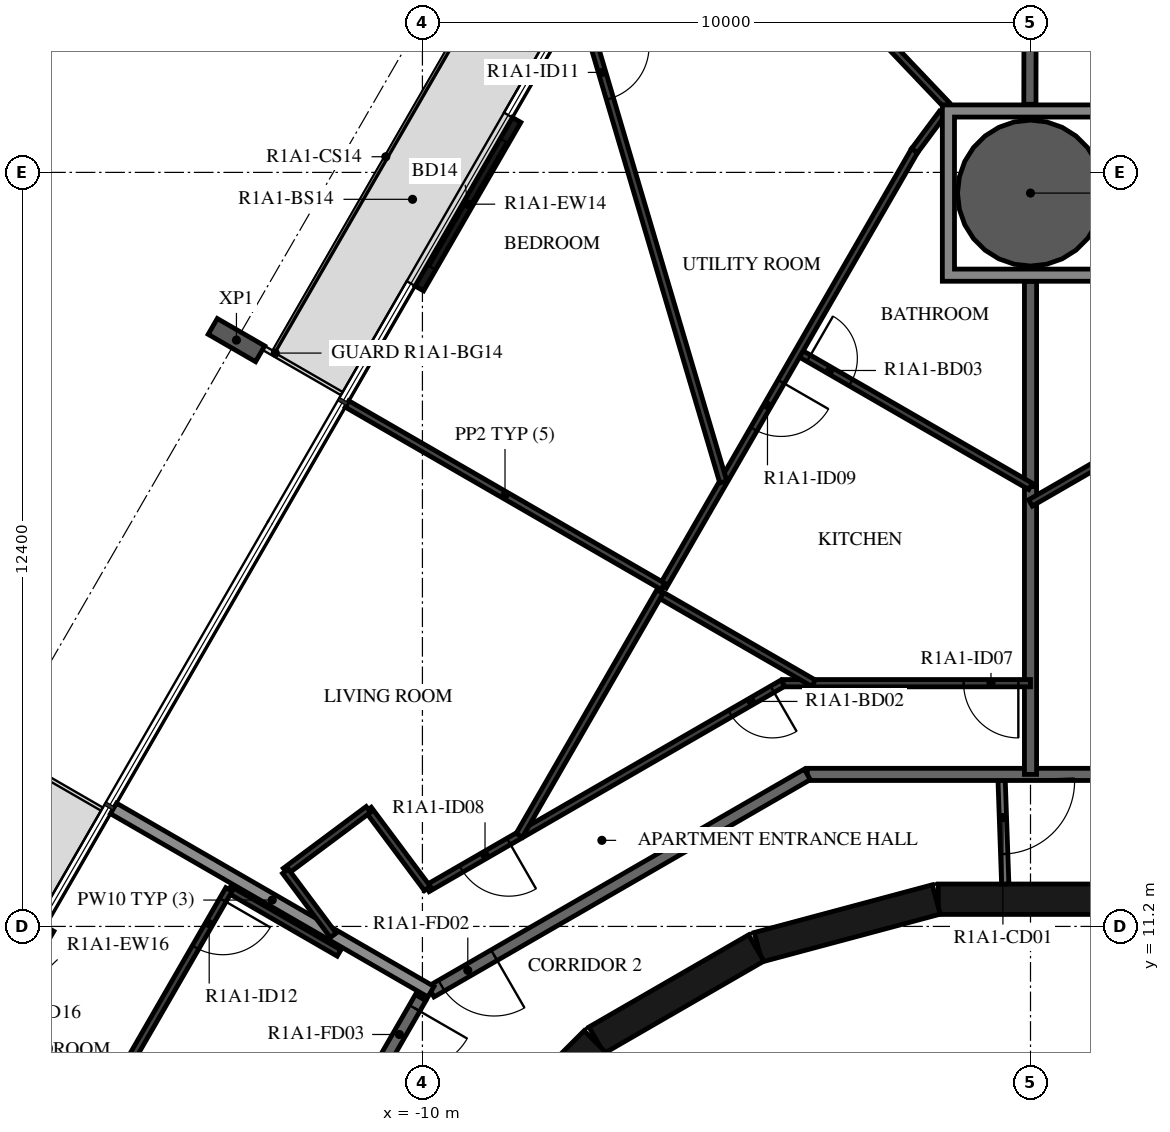
"""IFC4 building model, lengths in metres.
Left out: names, types, materials, properties, quantities, classifications, styles, units other than length and angle.
Written with IfcOpenShell. Run it as: python <this file> out.ifc"""

import sys

from ifc_helpers import new_model, si_unit, direction, frame, frame_2d, origin, origin_2d, place, context, subcontext, project, spatial, polyline, rectangle, hollow_circle, i_section, outline, extrude, element, fill, save


model = new_model("IFC4")
c1 = context("Model", 3, precision=1e-05, world=origin(), true_north=direction((0.0, 1.0)))
c2 = subcontext(c1, "Body", "Model", "MODEL_VIEW")
j1 = project(units=[si_unit("LENGTHUNIT", "METRE"), si_unit("PLANEANGLEUNIT", "RADIAN")], contexts=[c1])
p1 = place(None, origin())
s1 = spatial("IfcSite", under=j1, at=p1, CompositionType="ELEMENT")
p2 = place(p1, origin())
s2 = spatial("IfcBuilding", under=s1, at=p2, CompositionType="ELEMENT")
p3 = place(p2, frame((0.0, 0.0, 41.9)))
s3 = spatial("IfcBuildingStorey", under=s2, at=p3, CompositionType="ELEMENT", Elevation=41.9)
p4 = place(p3, frame((0.0, 23.26, -0.38), z_axis=(0.0, 0.0, 1.0), x_axis=(1.0, 0.0, 0.0)))
e1 = element("IfcColumn", 1, at=p4, inside=s3, PredefinedType="COLUMN", context=c2, shape_type="SweptSolid", body=[
    extrude(hollow_circle(Radius=1.2, WallThickness=0.06, at=origin_2d()), origin(), (0.0, 0.0, 1.0), 3.5),
])
p5 = place(p3, frame((-13.059, 20.842, -0.38), z_axis=(0.0, 0.0, 1.0), x_axis=(0.50000017485, 0.866025302835, 0.0)))
e2 = element("IfcColumn", 2, at=p5, inside=s3, PredefinedType="COLUMN", context=c2, shape_type="SweptSolid", body=[
    extrude(i_section(OverallWidth=0.3, OverallDepth=0.9, WebThickness=0.019, FlangeThickness=0.035, FilletRadius=0.03, at=origin_2d()), origin(), (0.0, 0.0, 1.0), 3.5),
])
p6 = place(p3, frame((-8.451, 24.463, 0.0), z_axis=(0.0, 0.0, 1.0), x_axis=(-0.499971222258, -0.866042017984, 0.0)))
e3 = element("IfcWall", 3, at=p6, inside=s3, PredefinedType="STANDARD", context=c2, shape_type="SweptSolid", body=[
    extrude(rectangle(XDim=3.2, YDim=0.16, at=frame_2d((1.6, 0.0))), origin(), (0.0, 0.0, 1.0), 3.12),
])
p7 = place(p6, frame((0.4, 0.0, 0.0)))
e4 = element("IfcOpeningElement", 4, at=p7, cuts=e3, PredefinedType="OPENING", context=c2, shape_type="SweptSolid", body=[
    extrude(rectangle(XDim=2.4, YDim=2.4, at=frame_2d((1.2, 1.2))), frame((0.0, 0.09, 0.0), z_axis=(0.0, -1.0, 0.0), x_axis=(1.0, 0.0, 0.0)), (0.0, 0.0, 1.0), 0.18),
])
p8 = place(p3, frame((-16.131, 11.161, 0.0), z_axis=(0.0, 0.0, 1.0), x_axis=(-0.500028443584, -0.866008981251, 0.0)))
e5 = element("IfcWall", 5, at=p8, inside=s3, PredefinedType="STANDARD", context=c2, shape_type="SweptSolid", body=[
    extrude(rectangle(XDim=3.2, YDim=0.16, at=frame_2d((1.6, 0.0))), origin(), (0.0, 0.0, 1.0), 3.12),
])
p9 = place(p8, frame((0.4, 0.0, 0.0)))
e6 = element("IfcOpeningElement", 6, at=p9, cuts=e5, PredefinedType="OPENING", context=c2, shape_type="SweptSolid", body=[
    extrude(rectangle(XDim=2.4, YDim=2.4, at=frame_2d((1.2, 1.2))), frame((0.0, 0.09, 0.0), z_axis=(0.0, -1.0, 0.0), x_axis=(1.0, 0.0, 0.0)), (0.0, 0.0, 1.0), 0.18),
])
for number, where, z_axis, x_axis in (
    (7, (1.516, 11.647, 0.0), (0.0, 0.0, 1.0), (-1.0, 0.0, 0.0)),
    (8, (-1.55, 11.643, 0.0), (0.0, 0.0, 1.0), (-0.966, -0.259, 0.0)),
    (9, (-4.51, 10.845, 0.0), (0.0, 0.0, 1.0), (-0.866, -0.5, 0.0)),
):
    element("IfcWall", number, at=place(p3, frame(where, z_axis=z_axis, x_axis=x_axis)), inside=s3, PredefinedType="SHEAR", context=c2, shape_type="SweptSolid", body=[
        extrude(rectangle(XDim=3.033, YDim=0.5, at=frame_2d((1.516, 0.0))), origin(), (0.0, 0.0, 1.0), 3.12),
    ])
p10 = place(p3, frame((-7.164, 9.308, 0.0), z_axis=(0.0, 0.0, 1.0), x_axis=(-0.707106781187, -0.707106781187, 0.0)))
e10 = element("IfcWall", 10, at=p10, inside=s3, PredefinedType="SHEAR", context=c2, shape_type="SweptSolid", body=[
    extrude(rectangle(XDim=3.032, YDim=0.5, at=frame_2d((1.516, 0.0))), origin(), (0.0, 0.0, 1.0), 3.12),
])
p11 = place(p10, frame((1.416, 0.0, 0.0)))
e11 = element("IfcOpeningElement", 11, at=p11, cuts=e10, PredefinedType="OPENING", context=c2, shape_type="SweptSolid", body=[
    extrude(rectangle(XDim=1.2, YDim=2.1, at=frame_2d((0.6, 1.05))), frame((0.0, 0.26, 0.0), z_axis=(0.0, -1.0, 0.0), x_axis=(1.0, 0.0, 0.0)), (0.0, 0.0, 1.0), 0.52),
])
p12 = place(p3, frame((-0.479, 13.7, 0.0), z_axis=(0.0, 0.0, 1.0), x_axis=(0.034919103017, -0.999390142159, 0.0)))
e12 = element("IfcWall", 12, at=p12, inside=s3, PredefinedType="PARTITIONING", context=c2, shape_type="SweptSolid", body=[
    extrude(rectangle(XDim=1.804, YDim=0.12, at=frame_2d((0.902, 0.0))), origin(), (0.0, 0.0, 1.0), 3.12),
])
p13 = place(p12, frame((0.11, 0.0, 0.0)))
e13 = element("IfcOpeningElement", 13, at=p13, cuts=e12, PredefinedType="OPENING", context=c2, shape_type="SweptSolid", body=[
    extrude(rectangle(XDim=1.2, YDim=2.1, at=frame_2d((0.6, 1.05))), frame((0.0, 0.07, 0.0), z_axis=(0.0, -1.0, 0.0), x_axis=(1.0, 0.0, 0.0)), (0.0, 0.0, 1.0), 0.14),
])
p14 = place(p3, frame((3.671, 13.7, 0.0), z_axis=(0.0, 0.0, 1.0), x_axis=(-1.0, 0.0, 0.0)))
e14 = element("IfcWall", 14, at=p14, inside=s3, PredefinedType="STANDARD", context=c2, shape_type="SweptSolid", body=[
    extrude(rectangle(XDim=7.342, YDim=0.2, at=frame_2d((3.671, 0.0))), origin(), (0.0, 0.0, 1.0), 3.12),
])
p15 = place(p3, frame((-3.671, 13.7, 0.0), z_axis=(0.0, 0.0, 1.0), x_axis=(-0.866031419417, -0.499989580474, 0.0)))
e15 = element("IfcWall", 15, at=p15, inside=s3, PredefinedType="STANDARD", context=c2, shape_type="SweptSolid", body=[
    extrude(rectangle(XDim=7.147, YDim=0.2, at=frame_2d((3.573, 0.0))), origin(), (0.0, 0.0, 1.0), 3.12),
])
p16 = place(p15, frame((5.947, 0.0, 0.0)))
e16 = element("IfcOpeningElement", 16, at=p16, cuts=e15, PredefinedType="OPENING", context=c2, shape_type="SweptSolid", body=[
    extrude(rectangle(XDim=1.0, YDim=2.1, at=frame_2d((0.5, 1.05))), frame((0.0, 0.11, 0.0), z_axis=(0.0, -1.0, 0.0), x_axis=(1.0, 0.0, 0.0)), (0.0, 0.0, 1.0), 0.22),
])
p17 = place(p3, frame((-10.029, 10.029, 0.0), z_axis=(0.0, 0.0, 1.0), x_axis=(-0.500001669485, -0.866024439905, 0.0)))
e17 = element("IfcWall", 17, at=p17, inside=s3, PredefinedType="STANDARD", context=c2, shape_type="SweptSolid", body=[
    extrude(rectangle(XDim=7.342, YDim=0.2, at=frame_2d((3.671, 0.0))), origin(), (0.0, 0.0, 1.0), 3.12),
])
p18 = place(p17, frame((0.2, 0.0, 0.0)))
e18 = element("IfcOpeningElement", 18, at=p18, cuts=e17, PredefinedType="OPENING", context=c2, shape_type="SweptSolid", body=[
    extrude(rectangle(XDim=1.0, YDim=2.1, at=frame_2d((0.5, 1.05))), frame((0.0, 0.11, 0.0), z_axis=(0.0, -1.0, 0.0), x_axis=(1.0, 0.0, 0.0)), (0.0, 0.0, 1.0), 0.22),
])
p19 = place(p3, frame((0.0, 18.437, 0.0), z_axis=(0.0, 0.0, 1.0), x_axis=(0.0, -1.0, 0.0)))
e19 = element("IfcWall", 19, at=p19, inside=s3, PredefinedType="STANDARD", context=c2, shape_type="SweptSolid", body=[
    extrude(rectangle(XDim=4.737, YDim=0.2, at=frame_2d((2.368, 0.0))), origin(), (0.0, 0.0, 1.0), 3.12),
])
p20 = place(p3, frame((0.0, 31.206, 0.0), z_axis=(0.0, 0.0, 1.0), x_axis=(-0.001543266126, -0.999998809164, 0.0)))
e20 = element("IfcWall", 20, at=p20, inside=s3, PredefinedType="STANDARD", context=c2, shape_type="SweptSolid", body=[
    extrude(rectangle(XDim=6.486, YDim=0.2, at=frame_2d((3.243, 0.0))), origin(), (0.0, 0.0, 1.0), 3.12),
])
p21 = place(p3, frame((0.0, 21.81, 0.0), z_axis=(0.0, 0.0, 1.0), x_axis=(0.0, -1.0, 0.0)))
e21 = element("IfcWall", 21, at=p21, inside=s3, PredefinedType="STANDARD", context=c2, shape_type="SweptSolid", body=[
    extrude(rectangle(XDim=3.373, YDim=0.2, at=frame_2d((1.687, 0.0))), origin(), (0.0, 0.0, 1.0), 3.12),
])
p22 = place(p3, frame((-15.08, 13.14, 0.0), z_axis=(0.0, 0.0, 1.0), x_axis=(0.86603112331, -0.49999009336, 0.0)))
e22 = element("IfcWall", 22, at=p22, inside=s3, PredefinedType="STANDARD", context=c2, shape_type="SweptSolid", body=[
    extrude(rectangle(XDim=6.027, YDim=0.2, at=frame_2d((3.014, 0.0))), origin(), (0.0, 0.0, 1.0), 2.73),
])
p23 = place(p3, frame((5.324, 21.239, 0.0), z_axis=(0.0, 0.0, 1.0), x_axis=(-0.866030172657, -0.49999173998, 0.0)))
e23 = element("IfcWall", 23, at=p23, inside=s3, PredefinedType="PARTITIONING", context=c2, shape_type="SweptSolid", body=[
    extrude(rectangle(XDim=6.147, YDim=0.12, at=frame_2d((3.074, 0.0))), origin(), (0.0, 0.0, 1.0), 3.12),
])
p24 = place(p23, frame((0.2, 0.0, 0.0)))
e24 = element("IfcOpeningElement", 24, at=p24, cuts=e23, PredefinedType="OPENING", context=c2, shape_type="SweptSolid", body=[
    extrude(rectangle(XDim=0.9, YDim=2.1, at=frame_2d((0.45, 1.05))), frame((0.0, 0.07, 0.0), z_axis=(0.0, -1.0, 0.0), x_axis=(1.0, 0.0, 0.0)), (0.0, 0.0, 1.0), 0.14),
])
p25 = place(p3, frame((0.0, 15.2, 0.0), z_axis=(0.0, 0.0, 1.0), x_axis=(-1.0, 0.0, 0.0)))
e25 = element("IfcWall", 25, at=p25, inside=s3, PredefinedType="PARTITIONING", context=c2, shape_type="SweptSolid", body=[
    extrude(rectangle(XDim=4.073, YDim=0.12, at=frame_2d((2.036, 0.0))), origin(), (0.0, 0.0, 1.0), 3.12),
])
p26 = place(p25, frame((0.2, 0.0, 0.0)))
e26 = element("IfcOpeningElement", 26, at=p26, cuts=e25, PredefinedType="OPENING", context=c2, shape_type="SweptSolid", body=[
    extrude(rectangle(XDim=0.9, YDim=2.1, at=frame_2d((0.45, 1.05))), frame((0.0, 0.07, 0.0), z_axis=(0.0, -1.0, 0.0), x_axis=(1.0, 0.0, 0.0)), (0.0, 0.0, 1.0), 0.14),
])
p27 = place(p3, frame((-4.073, 15.2, 0.0), z_axis=(0.0, 0.0, 1.0), x_axis=(-0.866024802457, -0.500001041529, 0.0)))
e27 = element("IfcWall", 27, at=p27, inside=s3, PredefinedType="PARTITIONING", context=c2, shape_type="SweptSolid", body=[
    extrude(rectangle(XDim=6.751, YDim=0.12, at=frame_2d((3.376, 0.0))), origin(), (0.0, 0.0, 1.0), 3.12),
])
p28 = place(p27, frame((0.2, 0.0, 0.0)))
e28 = element("IfcOpeningElement", 28, at=p28, cuts=e27, PredefinedType="OPENING", context=c2, shape_type="SweptSolid", body=[
    extrude(rectangle(XDim=0.8, YDim=2.1, at=frame_2d((0.4, 1.05))), frame((0.0, 0.07, 0.0), z_axis=(0.0, -1.0, 0.0), x_axis=(1.0, 0.0, 0.0)), (0.0, 0.0, 1.0), 0.14),
])
p29 = place(p27, frame((5.206, 0.0, 0.0)))
e29 = element("IfcOpeningElement", 29, at=p29, cuts=e27, PredefinedType="OPENING", context=c2, shape_type="SweptSolid", body=[
    extrude(rectangle(XDim=0.9, YDim=2.1, at=frame_2d((0.45, 1.05))), frame((0.0, 0.07, 0.0), z_axis=(0.0, -1.0, 0.0), x_axis=(1.0, 0.0, 0.0)), (0.0, 0.0, 1.0), 0.14),
])
p30 = place(p3, frame((-9.92, 11.824, 0.0), z_axis=(0.0, 0.0, 1.0), x_axis=(-0.597853402964, 0.801605456921, 0.0)))
e30 = element("IfcWall", 30, at=p30, inside=s3, PredefinedType="PARTITIONING", context=c2, shape_type="SweptSolid", body=[
    extrude(rectangle(XDim=1.621, YDim=0.12, at=frame_2d((0.811, 0.0))), origin(), (0.0, 0.0, 1.0), 3.12),
])
p31 = place(p3, frame((-10.889, 13.124, 0.0), z_axis=(0.0, 0.0, 1.0), x_axis=(-0.801616976804, -0.597837956724, 0.0)))
e31 = element("IfcWall", 31, at=p31, inside=s3, PredefinedType="PARTITIONING", context=c2, shape_type="SweptSolid", body=[
    extrude(rectangle(XDim=1.7, YDim=0.12, at=frame_2d((0.85, 0.0))), origin(), (0.0, 0.0, 1.0), 3.12),
])
p32 = place(p3, frame((-12.252, 12.107, 0.0), z_axis=(0.0, 0.0, 1.0), x_axis=(0.597827926538, -0.801624457119, 0.0)))
e32 = element("IfcWall", 32, at=p32, inside=s3, PredefinedType="PARTITIONING", context=c2, shape_type="SweptSolid", body=[
    extrude(rectangle(XDim=1.314, YDim=0.12, at=frame_2d((0.657, 0.0))), origin(), (0.0, 0.0, 1.0), 3.12),
])
p33 = place(p3, frame((-5.487, 29.028, 0.0), z_axis=(0.0, 0.0, 1.0), x_axis=(0.689189638576, -0.724581011398, 0.0)))
e33 = element("IfcWall", 33, at=p33, inside=s3, PredefinedType="PARTITIONING", context=c2, shape_type="SweptSolid", body=[
    extrude(rectangle(XDim=5.96, YDim=0.12, at=frame_2d((2.98, 0.0))), origin(), (0.0, 0.0, 1.0), 3.12),
])
p34 = place(p33, frame((0.2, 0.0, 0.0)))
e34 = element("IfcOpeningElement", 34, at=p34, cuts=e33, PredefinedType="OPENING", context=c2, shape_type="SweptSolid", body=[
    extrude(rectangle(XDim=0.9, YDim=2.1, at=frame_2d((0.45, 1.05))), frame((0.0, 0.07, 0.0), z_axis=(0.0, -1.0, 0.0), x_axis=(1.0, 0.0, 0.0)), (0.0, 0.0, 1.0), 0.14),
])
p35 = place(p3, frame((-3.821, 20.643, 0.0), z_axis=(0.0, 0.0, 1.0), x_axis=(0.866024310165, -0.5000018942, 0.0)))
e35 = element("IfcWall", 35, at=p35, inside=s3, PredefinedType="PARTITIONING", context=c2, shape_type="SweptSolid", body=[
    extrude(rectangle(XDim=4.412, YDim=0.12, at=frame_2d((2.206, 0.0))), origin(), (0.0, 0.0, 1.0), 3.12),
])
p36 = place(p35, frame((0.2, 0.0, 0.0)))
e36 = element("IfcOpeningElement", 36, at=p36, cuts=e35, PredefinedType="OPENING", context=c2, shape_type="SweptSolid", body=[
    extrude(rectangle(XDim=0.8, YDim=2.1, at=frame_2d((0.4, 1.05))), frame((0.0, 0.07, 0.0), z_axis=(0.0, -1.0, 0.0), x_axis=(1.0, 0.0, 0.0)), (0.0, 0.0, 1.0), 0.14),
])
p37 = place(p3, frame((-1.45, 24.571, 0.0), z_axis=(0.0, 0.0, 1.0), x_axis=(-0.597187509737, -0.802101663266, 0.0)))
e37 = element("IfcWall", 37, at=p37, inside=s3, PredefinedType="PARTITIONING", context=c2, shape_type="SweptSolid", body=[
    extrude(rectangle(XDim=0.765, YDim=0.12, at=frame_2d((0.382, 0.0))), origin(), (0.0, 0.0, 1.0), 3.12),
])
p38 = place(p3, frame((-1.907, 23.957, 0.0), z_axis=(0.0, 0.0, 1.0), x_axis=(-0.499994901178, -0.866028347571, 0.0)))
e38 = element("IfcWall", 38, at=p38, inside=s3, PredefinedType="PARTITIONING", context=c2, shape_type="SweptSolid", body=[
    extrude(rectangle(XDim=8.274, YDim=0.12, at=frame_2d((4.137, 0.0))), origin(), (0.0, 0.0, 1.0), 3.12),
])
p39 = place(p38, frame((4.387, 0.0, 0.0)))
e39 = element("IfcOpeningElement", 39, at=p39, cuts=e38, PredefinedType="OPENING", context=c2, shape_type="SweptSolid", body=[
    extrude(rectangle(XDim=0.9, YDim=2.1, at=frame_2d((0.45, 1.05))), frame((0.0, 0.07, 0.0), z_axis=(0.0, -1.0, 0.0), x_axis=(1.0, 0.0, 0.0)), (0.0, 0.0, 1.0), 0.14),
])
p40 = place(p3, frame((-6.114, 16.67, 0.0), z_axis=(0.0, 0.0, 1.0), x_axis=(0.866011328839, -0.500024377727, 0.0)))
e40 = element("IfcWall", 40, at=p40, inside=s3, PredefinedType="PARTITIONING", context=c2, shape_type="SweptSolid", body=[
    extrude(rectangle(XDim=2.94, YDim=0.12, at=frame_2d((1.47, 0.0))), origin(), (0.0, 0.0, 1.0), 3.12),
])
p41 = place(p3, frame((-7.4, 26.443, 0.0), z_axis=(0.0, 0.0, 1.0), x_axis=(0.283777867447, -0.95889004685, 0.0)))
e41 = element("IfcWall", 41, at=p41, inside=s3, PredefinedType="PARTITIONING", context=c2, shape_type="SweptSolid", body=[
    extrude(rectangle(XDim=8.274, YDim=0.12, at=frame_2d((4.137, 0.0))), origin(), (0.0, 0.0, 1.0), 3.12),
])
p42 = place(p41, frame((0.8, 0.0, 0.0)))
e42 = element("IfcOpeningElement", 42, at=p42, cuts=e41, PredefinedType="OPENING", context=c2, shape_type="SweptSolid", body=[
    extrude(rectangle(XDim=0.9, YDim=2.1, at=frame_2d((0.45, 1.05))), frame((0.0, 0.07, 0.0), z_axis=(0.0, -1.0, 0.0), x_axis=(1.0, 0.0, 0.0)), (0.0, 0.0, 1.0), 0.14),
])
p43 = place(p3, frame((-11.24, 19.792, 0.0), z_axis=(0.0, 0.0, 1.0), x_axis=(0.866031096941, -0.499990139034, 0.0)))
e43 = element("IfcWall", 43, at=p43, inside=s3, PredefinedType="PARTITIONING", context=c2, shape_type="SweptSolid", body=[
    extrude(rectangle(XDim=6.0, YDim=0.12, at=frame_2d((3.0, 0.0))), origin(), (0.0, 0.0, 1.0), 2.73),
])
p44 = place(p3, frame((-6.094, 16.705, 0.0), z_axis=(0.0, 0.0, 1.0), x_axis=(-0.500014747178, -0.86601688933, 0.0)))
e44 = element("IfcWall", 44, at=p44, inside=s3, PredefinedType="PARTITIONING", context=c2, shape_type="SweptSolid", body=[
    extrude(rectangle(XDim=4.627, YDim=0.12, at=frame_2d((2.313, 0.0))), origin(), (0.0, 0.0, 1.0), 3.12),
])
p45 = place(p3, frame((-11.372, 10.763, 0.0), z_axis=(0.0, 0.0, 1.0), x_axis=(-0.866041603473, 0.499971940267, 0.0)))
e45 = element("IfcWall", 45, at=p45, inside=s3, PredefinedType="PARTITIONING", context=c2, shape_type="SweptSolid", body=[
    extrude(rectangle(XDim=2.089, YDim=0.12, at=frame_2d((1.045, 0.0))), origin(), (0.0, 0.0, 1.0), 3.12),
])
p46 = place(p3, frame((-13.181, 11.808, 0.0), z_axis=(0.0, 0.0, 1.0), x_axis=(-0.50002983664, -0.866008176907, 0.0)))
e46 = element("IfcWall", 46, at=p46, inside=s3, PredefinedType="PARTITIONING", context=c2, shape_type="SweptSolid", body=[
    extrude(rectangle(XDim=4.4, YDim=0.12, at=frame_2d((2.2, 0.0))), origin(), (0.0, 0.0, 1.0), 3.12),
])
p47 = place(p46, frame((0.2, 0.0, 0.0)))
e47 = element("IfcOpeningElement", 47, at=p47, cuts=e46, PredefinedType="OPENING", context=c2, shape_type="SweptSolid", body=[
    extrude(rectangle(XDim=0.9, YDim=2.1, at=frame_2d((0.45, 1.05))), frame((0.0, 0.07, 0.0), z_axis=(0.0, -1.0, 0.0), x_axis=(1.0, 0.0, 0.0)), (0.0, 0.0, 1.0), 0.14),
])
p48 = place(p3, origin())
e48 = element("IfcWall", 48, at=p48, inside=s3, PredefinedType="STANDARD", context=c2, shape_type="SweptSolid", body=[
    extrude(outline(polyline([(1.45, 24.71), (1.45, 21.81), (-1.45, 21.81), (-1.45, 24.71), (1.45, 24.71)]), holes=[polyline([(-1.25, 22.01), (1.25, 22.01), (1.25, 24.51), (-1.25, 24.51), (-1.25, 22.01)])]), origin(), (0.0, 0.0, 1.0), 3.12),
])
p49 = place(p7, origin())
e49 = element("IfcDoor", 49, at=p49, inside=s3, OperationType="DOUBLE_DOOR_SLIDING", PredefinedType="DOOR", context=c2, shape_type="SweptSolid", body=[
    extrude(rectangle(XDim=2.4, YDim=2.4, at=frame_2d((1.2, 1.2))), frame((0.0, 0.025, 0.0), z_axis=(0.0, -1.0, 0.0), x_axis=(1.0, 0.0, 0.0)), (0.0, 0.0, 1.0), 0.05),
])
fill(e4, e49)
p50 = place(p16, origin())
e50 = element("IfcDoor", 50, at=p50, inside=s3, OperationType="SINGLE_SWING_LEFT", PredefinedType="DOOR", context=c2, shape_type="SweptSolid", body=[
    extrude(rectangle(XDim=1.0, YDim=2.1, at=frame_2d((0.5, 1.05))), frame((0.0, 0.025, 0.0), z_axis=(0.0, -1.0, 0.0), x_axis=(1.0, 0.0, 0.0)), (0.0, 0.0, 1.0), 0.05),
])
fill(e16, e50)
p51 = place(p26, origin())
e51 = element("IfcDoor", 51, at=p51, inside=s3, OperationType="SINGLE_SWING_RIGHT", PredefinedType="DOOR", context=c2, shape_type="SweptSolid", body=[
    extrude(rectangle(XDim=0.9, YDim=2.1, at=frame_2d((0.45, 1.05))), frame((0.0, 0.025, 0.0), z_axis=(0.0, -1.0, 0.0), x_axis=(1.0, 0.0, 0.0)), (0.0, 0.0, 1.0), 0.05),
])
fill(e26, e51)
p52 = place(p28, origin())
e52 = element("IfcDoor", 52, at=p52, inside=s3, OperationType="SINGLE_SWING_LEFT", PredefinedType="DOOR", context=c2, shape_type="SweptSolid", body=[
    extrude(rectangle(XDim=0.8, YDim=2.1, at=frame_2d((0.4, 1.05))), frame((0.0, 0.025, 0.0), z_axis=(0.0, -1.0, 0.0), x_axis=(1.0, 0.0, 0.0)), (0.0, 0.0, 1.0), 0.05),
])
fill(e28, e52)
p53 = place(p29, origin())
e53 = element("IfcDoor", 53, at=p53, inside=s3, OperationType="SINGLE_SWING_LEFT", PredefinedType="DOOR", context=c2, shape_type="SweptSolid", body=[
    extrude(rectangle(XDim=0.9, YDim=2.1, at=frame_2d((0.45, 1.05))), frame((0.0, 0.025, 0.0), z_axis=(0.0, -1.0, 0.0), x_axis=(1.0, 0.0, 0.0)), (0.0, 0.0, 1.0), 0.05),
])
fill(e29, e53)
p54 = place(p36, origin())
e54 = element("IfcDoor", 54, at=p54, inside=s3, OperationType="SINGLE_SWING_LEFT", PredefinedType="DOOR", context=c2, shape_type="SweptSolid", body=[
    extrude(rectangle(XDim=0.8, YDim=2.1, at=frame_2d((0.4, 1.05))), frame((0.0, 0.025, 0.0), z_axis=(0.0, -1.0, 0.0), x_axis=(1.0, 0.0, 0.0)), (0.0, 0.0, 1.0), 0.05),
])
fill(e36, e54)
p55 = place(p39, origin())
e55 = element("IfcDoor", 55, at=p55, inside=s3, OperationType="SINGLE_SWING_LEFT", PredefinedType="DOOR", context=c2, shape_type="SweptSolid", body=[
    extrude(rectangle(XDim=0.9, YDim=2.1, at=frame_2d((0.45, 1.05))), frame((0.0, 0.025, 0.0), z_axis=(0.0, -1.0, 0.0), x_axis=(1.0, 0.0, 0.0)), (0.0, 0.0, 1.0), 0.05),
])
fill(e39, e55)
p56 = place(p42, origin())
e56 = element("IfcDoor", 56, at=p56, inside=s3, OperationType="SINGLE_SWING_RIGHT", PredefinedType="DOOR", context=c2, shape_type="SweptSolid", body=[
    extrude(rectangle(XDim=0.9, YDim=2.1, at=frame_2d((0.45, 1.05))), frame((0.0, 0.025, 0.0), z_axis=(0.0, -1.0, 0.0), x_axis=(1.0, 0.0, 0.0)), (0.0, 0.0, 1.0), 0.05),
])
fill(e42, e56)
p57 = place(p18, origin())
e57 = element("IfcDoor", 57, at=p57, inside=s3, OperationType="SINGLE_SWING_LEFT", PredefinedType="DOOR", context=c2, shape_type="SweptSolid", body=[
    extrude(rectangle(XDim=1.0, YDim=2.1, at=frame_2d((0.5, 1.05))), frame((0.0, 0.025, 0.0), z_axis=(0.0, -1.0, 0.0), x_axis=(1.0, 0.0, 0.0)), (0.0, 0.0, 1.0), 0.05),
])
fill(e18, e57)
p58 = place(p47, origin())
e58 = element("IfcDoor", 58, at=p58, inside=s3, OperationType="SINGLE_SWING_LEFT", PredefinedType="DOOR", context=c2, shape_type="SweptSolid", body=[
    extrude(rectangle(XDim=0.9, YDim=2.1, at=frame_2d((0.45, 1.05))), frame((0.0, 0.025, 0.0), z_axis=(0.0, -1.0, 0.0), x_axis=(1.0, 0.0, 0.0)), (0.0, 0.0, 1.0), 0.05),
])
fill(e47, e58)
p59 = place(p13, origin())
e59 = element("IfcDoor", 59, at=p59, inside=s3, OperationType="DOUBLE_DOOR_SINGLE_SWING", PredefinedType="DOOR", context=c2, shape_type="SweptSolid", body=[
    extrude(rectangle(XDim=1.2, YDim=2.1, at=frame_2d((0.6, 1.05))), frame((0.0, 0.025, 0.0), z_axis=(0.0, -1.0, 0.0), x_axis=(1.0, 0.0, 0.0)), (0.0, 0.0, 1.0), 0.05),
])
fill(e13, e59)
save(model, sys.argv[1])
